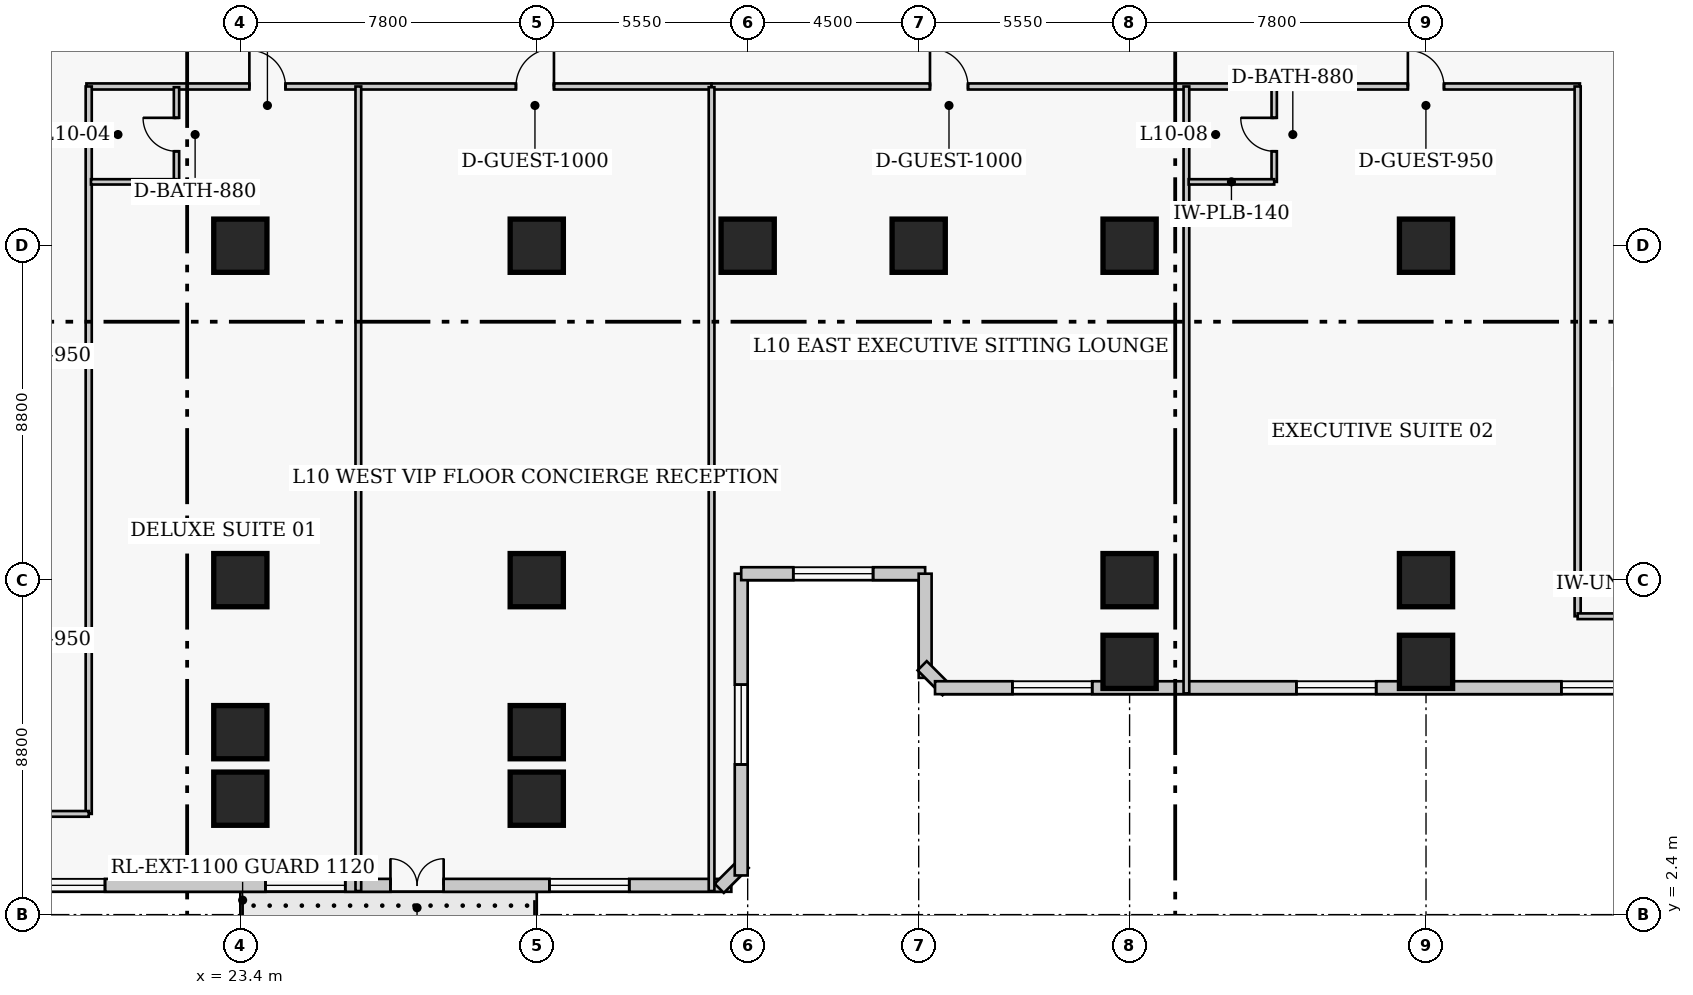
"""IFC4 building model, lengths in metres.
Left out: names, types, materials, properties, quantities, classifications, styles, units other than length and angle.
Written with IfcOpenShell. Run it as: python <this file> out.ifc"""

import sys

from ifc_helpers import new_model, si_unit, direction, frame, frame_2d, origin, origin_2d, place, context, subcontext, project, spatial, rectangle, extrude, element, fill, save


model = new_model("IFC4")
c1 = context("Model", 3, precision=1e-05, world=origin(), true_north=direction((0.0, 1.0)))
c2 = subcontext(c1, "Body", "Model", "MODEL_VIEW")
j1 = project(units=[si_unit("LENGTHUNIT", "METRE"), si_unit("PLANEANGLEUNIT", "RADIAN")], contexts=[c1])
p1 = place(None, origin())
s1 = spatial("IfcSite", under=j1, at=p1, CompositionType="ELEMENT")
p2 = place(p1, origin())
s2 = spatial("IfcBuilding", under=s1, at=p2, CompositionType="ELEMENT")
p3 = place(p2, frame((0.0, 0.0, 45.0)))
s3 = spatial("IfcBuildingStorey", under=s2, at=p3, CompositionType="ELEMENT", Elevation=45.0)
for number, where, z_axis, x_axis in (
    (1, (23.4, 11.2, 0.0), (0.0, 0.0, 1.0), (1.0, 0.0, 0.0)),
    (2, (23.4, 20.0, 0.0), (0.0, 0.0, 1.0), (1.0, 0.0, 0.0)),
    (3, (31.2, 11.2, 0.0), (0.0, 0.0, 1.0), (1.0, 0.0, 0.0)),
    (4, (31.2, 20.0, 0.0), (0.0, 0.0, 1.0), (1.0, 0.0, 0.0)),
    (5, (36.75, 20.0, 0.0), (0.0, 0.0, 1.0), (1.0, 0.0, 0.0)),
    (6, (41.25, 20.0, 0.0), (0.0, 0.0, 1.0), (1.0, 0.0, 0.0)),
    (7, (46.8, 11.2, 0.0), (0.0, 0.0, 1.0), (1.0, 0.0, 0.0)),
    (8, (46.8, 20.0, 0.0), (0.0, 0.0, 1.0), (1.0, 0.0, 0.0)),
    (9, (54.6, 11.2, 0.0), (0.0, 0.0, 1.0), (1.0, 0.0, 0.0)),
    (10, (54.6, 20.0, 0.0), (0.0, 0.0, 1.0), (1.0, 0.0, 0.0)),
    (11, (23.4, 7.2, 0.0), (0.0, 0.0, 1.0), (1.0, 0.0, 0.0)),
    (12, (31.2, 7.2, 0.0), (0.0, 0.0, 1.0), (1.0, 0.0, 0.0)),
    (13, (23.4, 5.45, 0.0), (0.0, 0.0, 1.0), (1.0, 0.0, 0.0)),
    (14, (31.2, 5.45, 0.0), (0.0, 0.0, 1.0), (1.0, 0.0, 0.0)),
    (15, (46.8, 9.05, 0.0), (0.0, 0.0, 1.0), (1.0, 0.0, 0.0)),
    (16, (54.6, 9.05, 0.0), (0.0, 0.0, 1.0), (1.0, 0.0, 0.0)),
):
    element("IfcColumn", number, at=place(p3, frame(where, z_axis=z_axis, x_axis=x_axis)), inside=s3, PredefinedType="COLUMN", context=c2, shape_type="SweptSolid", body=[
        extrude(rectangle(XDim=1.4, YDim=1.4, at=origin_2d()), origin(), (0.0, 0.0, 1.0), 3.8),
    ])
p4 = place(p3, frame((6.43, 3.17, 0.0), z_axis=(0.0, 0.0, 1.0), x_axis=(1.0, 0.0, 0.0)))
e17 = element("IfcWall", 17, at=p4, inside=s3, PredefinedType="SOLIDWALL", context=c2, shape_type="SweptSolid", body=[
    extrude(rectangle(XDim=29.89, YDim=0.34, at=frame_2d((14.945, 0.0))), origin(), (0.0, 0.0, 1.0), 3.54),
])
p5 = place(p4, frame((20.92, 0.0, 0.0)))
e18 = element("IfcOpeningElement", 18, at=p5, cuts=e17, PredefinedType="OPENING", context=c2, shape_type="SweptSolid", body=[
    extrude(rectangle(XDim=1.4, YDim=2.15, at=frame_2d((0.7, 1.075))), frame((0.0, 0.18, 0.0), z_axis=(0.0, -1.0, 0.0), x_axis=(1.0, 0.0, 0.0)), (0.0, 0.0, 1.0), 0.36),
])
p6 = place(p4, frame((2.686, 0.0, 0.85)))
e19 = element("IfcOpeningElement", 19, at=p6, cuts=e17, PredefinedType="OPENING", context=c2, shape_type="SweptSolid", body=[
    extrude(rectangle(XDim=2.1, YDim=1.85, at=frame_2d((1.05, 0.925))), frame((0.0, 0.18, 0.0), z_axis=(0.0, -1.0, 0.0), x_axis=(1.0, 0.0, 0.0)), (0.0, 0.0, 1.0), 0.36),
])
p7 = place(p4, frame((11.309, 0.0, 0.85)))
e20 = element("IfcOpeningElement", 20, at=p7, cuts=e17, PredefinedType="OPENING", context=c2, shape_type="SweptSolid", body=[
    extrude(rectangle(XDim=2.1, YDim=1.85, at=frame_2d((1.05, 0.925))), frame((0.0, 0.18, 0.0), z_axis=(0.0, -1.0, 0.0), x_axis=(1.0, 0.0, 0.0)), (0.0, 0.0, 1.0), 0.36),
])
p8 = place(p4, frame((17.631, 0.0, 0.85)))
e21 = element("IfcOpeningElement", 21, at=p8, cuts=e17, PredefinedType="OPENING", context=c2, shape_type="SweptSolid", body=[
    extrude(rectangle(XDim=2.1, YDim=1.85, at=frame_2d((1.05, 0.925))), frame((0.0, 0.18, 0.0), z_axis=(0.0, -1.0, 0.0), x_axis=(1.0, 0.0, 0.0)), (0.0, 0.0, 1.0), 0.36),
])
p9 = place(p4, frame((25.104, 0.0, 0.85)))
e22 = element("IfcOpeningElement", 22, at=p9, cuts=e17, PredefinedType="OPENING", context=c2, shape_type="SweptSolid", body=[
    extrude(rectangle(XDim=2.1, YDim=1.85, at=frame_2d((1.05, 0.925))), frame((0.0, 0.18, 0.0), z_axis=(0.0, -1.0, 0.0), x_axis=(1.0, 0.0, 0.0)), (0.0, 0.0, 1.0), 0.36),
])
p10 = place(p3, frame((36.001, 3.092, 0.0), z_axis=(0.0, 0.0, 1.0), x_axis=(0.707106781187, 0.707106781187, 0.0)))
e23 = element("IfcWall", 23, at=p10, inside=s3, PredefinedType="SOLIDWALL", context=c2, shape_type="SweptSolid", body=[
    extrude(rectangle(XDim=0.929, YDim=0.34, at=frame_2d((0.464, 0.0))), origin(), (0.0, 0.0, 1.0), 3.54),
])
p11 = place(p3, frame((36.58, 3.43, 0.0), z_axis=(0.0, 0.0, 1.0), x_axis=(0.0, 1.0, 0.0)))
e24 = element("IfcWall", 24, at=p11, inside=s3, PredefinedType="SOLIDWALL", context=c2, shape_type="SweptSolid", body=[
    extrude(rectangle(XDim=7.94, YDim=0.34, at=frame_2d((3.97, 0.0))), origin(), (0.0, 0.0, 1.0), 3.54),
])
p12 = place(p11, frame((2.92, 0.0, 0.85)))
e25 = element("IfcOpeningElement", 25, at=p12, cuts=e24, PredefinedType="OPENING", context=c2, shape_type="SweptSolid", body=[
    extrude(rectangle(XDim=2.1, YDim=1.85, at=frame_2d((1.05, 0.925))), frame((0.0, 0.18, 0.0), z_axis=(0.0, -1.0, 0.0), x_axis=(1.0, 0.0, 0.0)), (0.0, 0.0, 1.0), 0.36),
])
p13 = place(p3, frame((36.58, 11.37, 0.0), z_axis=(0.0, 0.0, 1.0), x_axis=(1.0, 0.0, 0.0)))
e26 = element("IfcWall", 26, at=p13, inside=s3, PredefinedType="SOLIDWALL", context=c2, shape_type="SweptSolid", body=[
    extrude(rectangle(XDim=4.84, YDim=0.34, at=frame_2d((2.42, 0.0))), origin(), (0.0, 0.0, 1.0), 3.54),
])
p14 = place(p13, frame((1.37, 0.0, 0.85)))
e27 = element("IfcOpeningElement", 27, at=p14, cuts=e26, PredefinedType="OPENING", context=c2, shape_type="SweptSolid", body=[
    extrude(rectangle(XDim=2.1, YDim=1.85, at=frame_2d((1.05, 0.925))), frame((0.0, 0.18, 0.0), z_axis=(0.0, -1.0, 0.0), x_axis=(1.0, 0.0, 0.0)), (0.0, 0.0, 1.0), 0.36),
])
p15 = place(p3, frame((41.42, 11.37, 0.0), z_axis=(0.0, 0.0, 1.0), x_axis=(0.0, -1.0, 0.0)))
e28 = element("IfcWall", 28, at=p15, inside=s3, PredefinedType="SOLIDWALL", context=c2, shape_type="SweptSolid", body=[
    extrude(rectangle(XDim=2.74, YDim=0.34, at=frame_2d((1.37, 0.0))), origin(), (0.0, 0.0, 1.0), 3.54),
])
p16 = place(p3, frame((41.342, 8.948, 0.0), z_axis=(0.0, 0.0, 1.0), x_axis=(0.707238225886, -0.706975312048, 0.0)))
e29 = element("IfcWall", 29, at=p16, inside=s3, PredefinedType="SOLIDWALL", context=c2, shape_type="SweptSolid", body=[
    extrude(rectangle(XDim=0.929, YDim=0.34, at=frame_2d((0.464, 0.0))), origin(), (0.0, 0.0, 1.0), 3.54),
])
p17 = place(p3, frame((41.68, 8.37, 0.0), z_axis=(0.0, 0.0, 1.0), x_axis=(1.0, 0.0, 0.0)))
e30 = element("IfcWall", 30, at=p17, inside=s3, PredefinedType="SOLIDWALL", context=c2, shape_type="SweptSolid", body=[
    extrude(rectangle(XDim=29.89, YDim=0.34, at=frame_2d((14.945, 0.0))), origin(), (0.0, 0.0, 1.0), 3.54),
])
p18 = place(p17, frame((2.036, 0.0, 0.85)))
e31 = element("IfcOpeningElement", 31, at=p18, cuts=e30, PredefinedType="OPENING", context=c2, shape_type="SweptSolid", body=[
    extrude(rectangle(XDim=2.1, YDim=1.85, at=frame_2d((1.05, 0.925))), frame((0.0, 0.18, 0.0), z_axis=(0.0, -1.0, 0.0), x_axis=(1.0, 0.0, 0.0)), (0.0, 0.0, 1.0), 0.36),
])
p19 = place(p17, frame((9.509, 0.0, 0.85)))
e32 = element("IfcOpeningElement", 32, at=p19, cuts=e30, PredefinedType="OPENING", context=c2, shape_type="SweptSolid", body=[
    extrude(rectangle(XDim=2.1, YDim=1.85, at=frame_2d((1.05, 0.925))), frame((0.0, 0.18, 0.0), z_axis=(0.0, -1.0, 0.0), x_axis=(1.0, 0.0, 0.0)), (0.0, 0.0, 1.0), 0.36),
])
p20 = place(p17, frame((16.481, 0.0, 0.85)))
e33 = element("IfcOpeningElement", 33, at=p20, cuts=e30, PredefinedType="OPENING", context=c2, shape_type="SweptSolid", body=[
    extrude(rectangle(XDim=2.1, YDim=1.85, at=frame_2d((1.05, 0.925))), frame((0.0, 0.18, 0.0), z_axis=(0.0, -1.0, 0.0), x_axis=(1.0, 0.0, 0.0)), (0.0, 0.0, 1.0), 0.36),
])
p21 = place(p17, frame((26.254, 0.0, 0.85)))
e34 = element("IfcOpeningElement", 34, at=p21, cuts=e30, PredefinedType="OPENING", context=c2, shape_type="SweptSolid", body=[
    extrude(rectangle(XDim=2.1, YDim=1.85, at=frame_2d((1.05, 0.925))), frame((0.0, 0.18, 0.0), z_axis=(0.0, -1.0, 0.0), x_axis=(1.0, 0.0, 0.0)), (0.0, 0.0, 1.0), 0.36),
])
p22 = place(p3, frame((19.35, 24.19, 0.0), z_axis=(0.0, 0.0, 1.0), x_axis=(1.0, 0.0, 0.0)))
e35 = element("IfcWall", 35, at=p22, inside=s3, PredefinedType="PARTITIONING", context=c2, shape_type="SweptSolid", body=[
    extrude(rectangle(XDim=16.45, YDim=0.16, at=frame_2d((8.225, 0.0))), origin(), (0.0, 0.0, 1.0), 3.54),
])
p23 = place(p22, frame((4.288, 0.0, 0.0)))
e36 = element("IfcOpeningElement", 36, at=p23, cuts=e35, PredefinedType="OPENING", context=c2, shape_type="SweptSolid", body=[
    extrude(rectangle(XDim=0.95, YDim=2.1, at=frame_2d((0.475, 1.05))), frame((0.0, 0.09, 0.0), z_axis=(0.0, -1.0, 0.0), x_axis=(1.0, 0.0, 0.0)), (0.0, 0.0, 1.0), 0.18),
])
p24 = place(p22, frame((11.302, 0.0, 0.0)))
e37 = element("IfcOpeningElement", 37, at=p24, cuts=e35, PredefinedType="OPENING", context=c2, shape_type="SweptSolid", body=[
    extrude(rectangle(XDim=1.0, YDim=2.15, at=frame_2d((0.5, 1.075))), frame((0.0, 0.09, 0.0), z_axis=(0.0, -1.0, 0.0), x_axis=(1.0, 0.0, 0.0)), (0.0, 0.0, 1.0), 0.18),
])
p25 = place(p3, frame((35.8, 24.19, 0.0), z_axis=(0.0, 0.0, 1.0), x_axis=(1.0, 0.0, 0.0)))
e38 = element("IfcWall", 38, at=p25, inside=s3, PredefinedType="PARTITIONING", context=c2, shape_type="SweptSolid", body=[
    extrude(rectangle(XDim=22.85, YDim=0.16, at=frame_2d((11.425, 0.0))), origin(), (0.0, 0.0, 1.0), 3.54),
])
p26 = place(p25, frame((5.748, 0.0, 0.0)))
e39 = element("IfcOpeningElement", 39, at=p26, cuts=e38, PredefinedType="OPENING", context=c2, shape_type="SweptSolid", body=[
    extrude(rectangle(XDim=1.0, YDim=2.15, at=frame_2d((0.5, 1.075))), frame((0.0, 0.09, 0.0), z_axis=(0.0, -1.0, 0.0), x_axis=(1.0, 0.0, 0.0)), (0.0, 0.0, 1.0), 0.18),
])
p27 = place(p25, frame((18.323, 0.0, 0.0)))
e40 = element("IfcOpeningElement", 40, at=p27, cuts=e38, PredefinedType="OPENING", context=c2, shape_type="SweptSolid", body=[
    extrude(rectangle(XDim=0.95, YDim=2.1, at=frame_2d((0.475, 1.05))), frame((0.0, 0.09, 0.0), z_axis=(0.0, -1.0, 0.0), x_axis=(1.0, 0.0, 0.0)), (0.0, 0.0, 1.0), 0.18),
])
p28 = place(p3, frame((19.41, 5.05, 0.0), z_axis=(0.0, 0.0, 1.0), x_axis=(0.0, 1.0, 0.0)))
e41 = element("IfcWall", 41, at=p28, inside=s3, PredefinedType="PARTITIONING", context=c2, shape_type="SweptSolid", body=[
    extrude(rectangle(XDim=19.14, YDim=0.16, at=frame_2d((9.57, 0.0))), origin(), (0.0, 0.0, 1.0), 3.004),
])
p29 = place(p3, frame((58.59, 10.25, 0.0), z_axis=(0.0, 0.0, 1.0), x_axis=(0.0, 1.0, 0.0)))
e42 = element("IfcWall", 42, at=p29, inside=s3, PredefinedType="PARTITIONING", context=c2, shape_type="SweptSolid", body=[
    extrude(rectangle(XDim=13.94, YDim=0.16, at=frame_2d((6.97, 0.0))), origin(), (0.0, 0.0, 1.0), 3.004),
])
for number, where, z_axis, x_axis in (
    (43, (58.59, 10.25, 0.0), (0.0, 0.0, 1.0), (1.0, 0.0, 0.0)),
    (44, (17.19, 5.05, 0.0), (0.0, 0.0, 1.0), (1.0, 0.0, 0.0)),
):
    element("IfcWall", number, at=place(p3, frame(where, z_axis=z_axis, x_axis=x_axis)), inside=s3, PredefinedType="PARTITIONING", context=c2, shape_type="SweptSolid", body=[
        extrude(rectangle(XDim=2.22, YDim=0.15, at=frame_2d((1.11, 0.0))), origin(), (0.0, 0.0, 1.0), 3.54),
    ])
p30 = place(p3, frame((21.72, 21.68, 0.0), z_axis=(0.0, 0.0, 1.0), x_axis=(0.0, 1.0, 0.0)))
e45 = element("IfcWall", 45, at=p30, inside=s3, PredefinedType="PLUMBINGWALL", context=c2, shape_type="SweptSolid", body=[
    extrude(rectangle(XDim=2.49, YDim=0.14, at=frame_2d((1.245, 0.0))), origin(), (0.0, 0.0, 1.0), 3.54),
])
p31 = place(p30, frame((0.805, 0.0, 0.0)))
e46 = element("IfcOpeningElement", 46, at=p31, cuts=e45, PredefinedType="OPENING", context=c2, shape_type="SweptSolid", body=[
    extrude(rectangle(XDim=0.88, YDim=2.05, at=frame_2d((0.44, 1.025))), frame((0.0, 0.08, 0.0), z_axis=(0.0, -1.0, 0.0), x_axis=(1.0, 0.0, 0.0)), (0.0, 0.0, 1.0), 0.16),
])
p32 = place(p3, frame((19.47, 21.68, 0.0), z_axis=(0.0, 0.0, 1.0), x_axis=(1.0, 0.0, 0.0)))
e47 = element("IfcWall", 47, at=p32, inside=s3, PredefinedType="PLUMBINGWALL", context=c2, shape_type="SweptSolid", body=[
    extrude(rectangle(XDim=2.25, YDim=0.14, at=frame_2d((1.125, 0.0))), origin(), (0.0, 0.0, 1.0), 3.54),
])
p33 = place(p3, frame((26.505, 3.02, 0.0), z_axis=(0.0, 0.0, 1.0), x_axis=(0.0, 1.0, 0.0)))
e48 = element("IfcWall", 48, at=p33, inside=s3, PredefinedType="PARTITIONING", context=c2, shape_type="SweptSolid", body=[
    extrude(rectangle(XDim=21.17, YDim=0.15, at=frame_2d((10.585, 0.0))), origin(), (0.0, 0.0, 1.0), 3.54),
])
p34 = place(p3, frame((35.8, 3.02, 0.0), z_axis=(0.0, 0.0, 1.0), x_axis=(0.0, 1.0, 0.0)))
e49 = element("IfcWall", 49, at=p34, inside=s3, PredefinedType="PARTITIONING", context=c2, shape_type="SweptSolid", body=[
    extrude(rectangle(XDim=21.15, YDim=0.15, at=frame_2d((10.575, 0.0))), origin(), (0.0, 0.0, 1.0), 3.54),
])
p35 = place(p3, frame((48.295, 8.22, 0.0), z_axis=(0.0, 0.0, 1.0), x_axis=(0.0, 1.0, 0.0)))
e50 = element("IfcWall", 50, at=p35, inside=s3, PredefinedType="PARTITIONING", context=c2, shape_type="SweptSolid", body=[
    extrude(rectangle(XDim=15.97, YDim=0.15, at=frame_2d((7.985, 0.0))), origin(), (0.0, 0.0, 1.0), 3.54),
])
p36 = place(p3, frame((50.605, 21.68, 0.0), z_axis=(0.0, 0.0, 1.0), x_axis=(0.0, 1.0, 0.0)))
e51 = element("IfcWall", 51, at=p36, inside=s3, PredefinedType="PLUMBINGWALL", context=c2, shape_type="SweptSolid", body=[
    extrude(rectangle(XDim=2.49, YDim=0.14, at=frame_2d((1.245, 0.0))), origin(), (0.0, 0.0, 1.0), 3.54),
])
p37 = place(p36, frame((0.805, 0.0, 0.0)))
e52 = element("IfcOpeningElement", 52, at=p37, cuts=e51, PredefinedType="OPENING", context=c2, shape_type="SweptSolid", body=[
    extrude(rectangle(XDim=0.88, YDim=2.05, at=frame_2d((0.44, 1.025))), frame((0.0, 0.08, 0.0), z_axis=(0.0, -1.0, 0.0), x_axis=(1.0, 0.0, 0.0)), (0.0, 0.0, 1.0), 0.16),
])
p38 = place(p3, frame((48.355, 21.68, 0.0), z_axis=(0.0, 0.0, 1.0), x_axis=(1.0, 0.0, 0.0)))
e53 = element("IfcWall", 53, at=p38, inside=s3, PredefinedType="PLUMBINGWALL", context=c2, shape_type="SweptSolid", body=[
    extrude(rectangle(XDim=2.25, YDim=0.14, at=frame_2d((1.125, 0.0))), origin(), (0.0, 0.0, 1.0), 3.54),
])
p39 = place(p5, origin())
e54 = element("IfcDoor", 54, at=p39, inside=s3, OperationType="DOUBLE_DOOR_SINGLE_SWING", PredefinedType="DOOR", context=c2, shape_type="SweptSolid", body=[
    extrude(rectangle(XDim=1.4, YDim=2.15, at=frame_2d((0.7, 1.075))), frame((0.0, 0.025, 0.0), z_axis=(0.0, -1.0, 0.0), x_axis=(1.0, 0.0, 0.0)), (0.0, 0.0, 1.0), 0.05),
])
fill(e18, e54)
p40 = place(p7, origin())
e55 = element("IfcWindow", 55, at=p40, inside=s3, PartitioningType="SINGLE_PANEL", PredefinedType="WINDOW", context=c2, shape_type="SweptSolid", body=[
    extrude(rectangle(XDim=2.1, YDim=1.85, at=frame_2d((1.05, 0.925))), frame((0.0, 0.03, 0.0), z_axis=(0.0, -1.0, 0.0), x_axis=(1.0, 0.0, 0.0)), (0.0, 0.0, 1.0), 0.06),
])
fill(e20, e55)
p41 = place(p8, origin())
e56 = element("IfcWindow", 56, at=p41, inside=s3, PartitioningType="SINGLE_PANEL", PredefinedType="WINDOW", context=c2, shape_type="SweptSolid", body=[
    extrude(rectangle(XDim=2.1, YDim=1.85, at=frame_2d((1.05, 0.925))), frame((0.0, 0.03, 0.0), z_axis=(0.0, -1.0, 0.0), x_axis=(1.0, 0.0, 0.0)), (0.0, 0.0, 1.0), 0.06),
])
fill(e21, e56)
p42 = place(p9, origin())
e57 = element("IfcWindow", 57, at=p42, inside=s3, PartitioningType="SINGLE_PANEL", PredefinedType="WINDOW", context=c2, shape_type="SweptSolid", body=[
    extrude(rectangle(XDim=2.1, YDim=1.85, at=frame_2d((1.05, 0.925))), frame((0.0, 0.03, 0.0), z_axis=(0.0, -1.0, 0.0), x_axis=(1.0, 0.0, 0.0)), (0.0, 0.0, 1.0), 0.06),
])
fill(e22, e57)
p43 = place(p12, origin())
e58 = element("IfcWindow", 58, at=p43, inside=s3, PartitioningType="SINGLE_PANEL", PredefinedType="WINDOW", context=c2, shape_type="SweptSolid", body=[
    extrude(rectangle(XDim=2.1, YDim=1.85, at=frame_2d((1.05, 0.925))), frame((0.0, 0.03, 0.0), z_axis=(0.0, -1.0, 0.0), x_axis=(1.0, 0.0, 0.0)), (0.0, 0.0, 1.0), 0.06),
])
fill(e25, e58)
p44 = place(p14, origin())
e59 = element("IfcWindow", 59, at=p44, inside=s3, PartitioningType="SINGLE_PANEL", PredefinedType="WINDOW", context=c2, shape_type="SweptSolid", body=[
    extrude(rectangle(XDim=2.1, YDim=1.85, at=frame_2d((1.05, 0.925))), frame((0.0, 0.03, 0.0), z_axis=(0.0, -1.0, 0.0), x_axis=(1.0, 0.0, 0.0)), (0.0, 0.0, 1.0), 0.06),
])
fill(e27, e59)
p45 = place(p18, origin())
e60 = element("IfcWindow", 60, at=p45, inside=s3, PartitioningType="SINGLE_PANEL", PredefinedType="WINDOW", context=c2, shape_type="SweptSolid", body=[
    extrude(rectangle(XDim=2.1, YDim=1.85, at=frame_2d((1.05, 0.925))), frame((0.0, 0.03, 0.0), z_axis=(0.0, -1.0, 0.0), x_axis=(1.0, 0.0, 0.0)), (0.0, 0.0, 1.0), 0.06),
])
fill(e31, e60)
p46 = place(p19, origin())
e61 = element("IfcWindow", 61, at=p46, inside=s3, PartitioningType="SINGLE_PANEL", PredefinedType="WINDOW", context=c2, shape_type="SweptSolid", body=[
    extrude(rectangle(XDim=2.1, YDim=1.85, at=frame_2d((1.05, 0.925))), frame((0.0, 0.03, 0.0), z_axis=(0.0, -1.0, 0.0), x_axis=(1.0, 0.0, 0.0)), (0.0, 0.0, 1.0), 0.06),
])
fill(e32, e61)
p47 = place(p20, origin())
e62 = element("IfcWindow", 62, at=p47, inside=s3, PartitioningType="SINGLE_PANEL", PredefinedType="WINDOW", context=c2, shape_type="SweptSolid", body=[
    extrude(rectangle(XDim=2.1, YDim=1.85, at=frame_2d((1.05, 0.925))), frame((0.0, 0.03, 0.0), z_axis=(0.0, -1.0, 0.0), x_axis=(1.0, 0.0, 0.0)), (0.0, 0.0, 1.0), 0.06),
])
fill(e33, e62)
p48 = place(p31, origin())
e63 = element("IfcDoor", 63, at=p48, inside=s3, OperationType="SINGLE_SWING_RIGHT", PredefinedType="DOOR", context=c2, shape_type="SweptSolid", body=[
    extrude(rectangle(XDim=0.88, YDim=2.05, at=frame_2d((0.44, 1.025))), frame((0.0, 0.025, 0.0), z_axis=(0.0, -1.0, 0.0), x_axis=(1.0, 0.0, 0.0)), (0.0, 0.0, 1.0), 0.05),
])
fill(e46, e63)
p49 = place(p23, origin())
e64 = element("IfcDoor", 64, at=p49, inside=s3, OperationType="SINGLE_SWING_LEFT", PredefinedType="DOOR", context=c2, shape_type="SweptSolid", body=[
    extrude(rectangle(XDim=0.95, YDim=2.1, at=frame_2d((0.475, 1.05))), frame((0.0, 0.025, 0.0), z_axis=(0.0, -1.0, 0.0), x_axis=(1.0, 0.0, 0.0)), (0.0, 0.0, 1.0), 0.05),
])
fill(e36, e64)
p50 = place(p24, origin())
e65 = element("IfcDoor", 65, at=p50, inside=s3, OperationType="SINGLE_SWING_RIGHT", PredefinedType="DOOR", context=c2, shape_type="SweptSolid", body=[
    extrude(rectangle(XDim=1.0, YDim=2.15, at=frame_2d((0.5, 1.075))), frame((0.0, 0.025, 0.0), z_axis=(0.0, -1.0, 0.0), x_axis=(1.0, 0.0, 0.0)), (0.0, 0.0, 1.0), 0.05),
])
fill(e37, e65)
p51 = place(p26, origin())
e66 = element("IfcDoor", 66, at=p51, inside=s3, OperationType="SINGLE_SWING_LEFT", PredefinedType="DOOR", context=c2, shape_type="SweptSolid", body=[
    extrude(rectangle(XDim=1.0, YDim=2.15, at=frame_2d((0.5, 1.075))), frame((0.0, 0.025, 0.0), z_axis=(0.0, -1.0, 0.0), x_axis=(1.0, 0.0, 0.0)), (0.0, 0.0, 1.0), 0.05),
])
fill(e39, e66)
p52 = place(p37, origin())
e67 = element("IfcDoor", 67, at=p52, inside=s3, OperationType="SINGLE_SWING_RIGHT", PredefinedType="DOOR", context=c2, shape_type="SweptSolid", body=[
    extrude(rectangle(XDim=0.88, YDim=2.05, at=frame_2d((0.44, 1.025))), frame((0.0, 0.025, 0.0), z_axis=(0.0, -1.0, 0.0), x_axis=(1.0, 0.0, 0.0)), (0.0, 0.0, 1.0), 0.05),
])
fill(e52, e67)
p53 = place(p27, origin())
e68 = element("IfcDoor", 68, at=p53, inside=s3, OperationType="SINGLE_SWING_LEFT", PredefinedType="DOOR", context=c2, shape_type="SweptSolid", body=[
    extrude(rectangle(XDim=0.95, YDim=2.1, at=frame_2d((0.475, 1.05))), frame((0.0, 0.025, 0.0), z_axis=(0.0, -1.0, 0.0), x_axis=(1.0, 0.0, 0.0)), (0.0, 0.0, 1.0), 0.05),
])
fill(e40, e68)
save(model, sys.argv[1])
